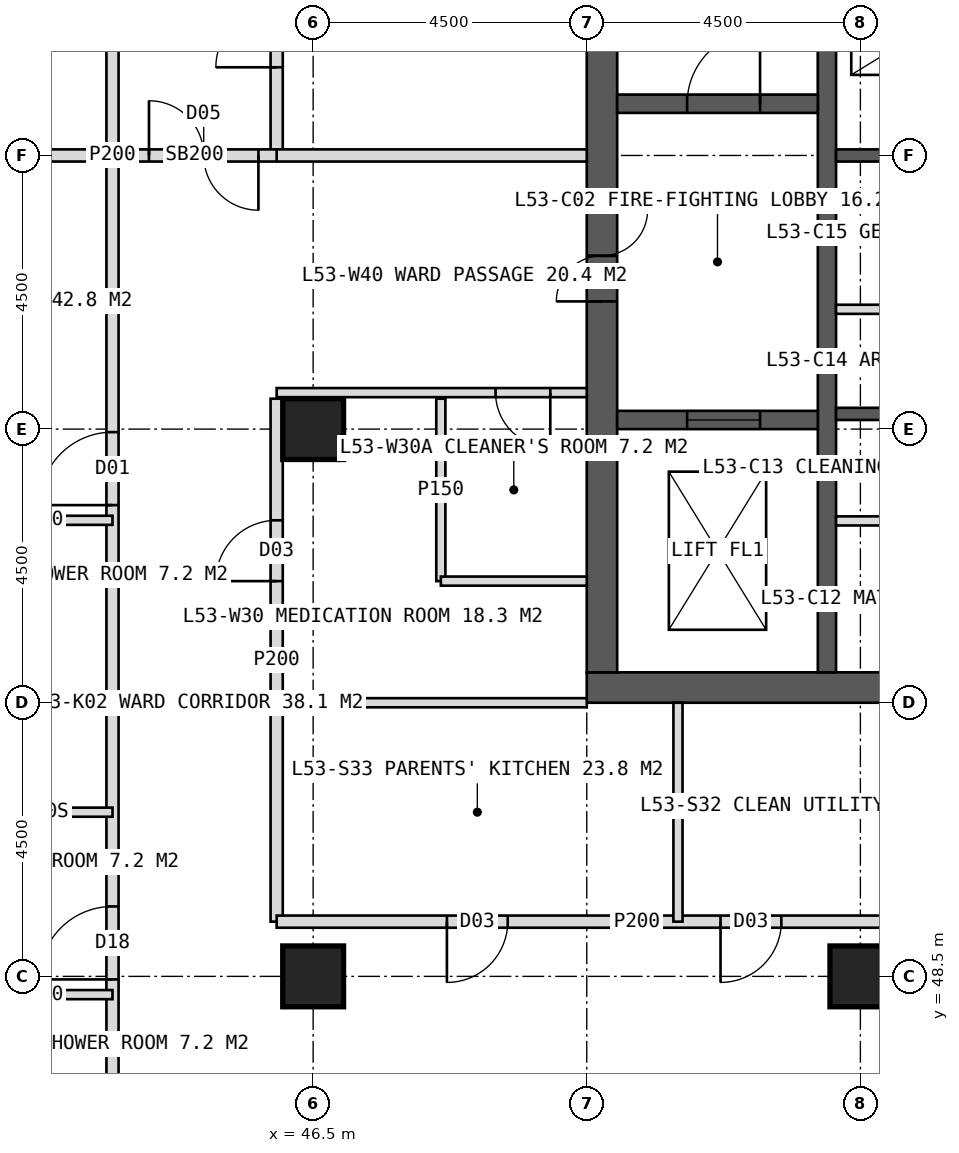
"""IFC4 building model, lengths in metres.
Left out: names, types, materials, properties, quantities, classifications, styles, units other than length and angle.
Written with IfcOpenShell. Run it as: python <this file> out.ifc"""

import sys

from ifc_helpers import new_model, si_unit, direction, frame, frame_2d, origin, origin_2d, place, context, subcontext, project, spatial, rectangle, hollow_rectangle, extrude, element, fill, save


model = new_model("IFC4")
c1 = context("Model", 3, precision=1e-05, world=origin(), true_north=direction((0.0, 1.0)))
c2 = subcontext(c1, "Body", "Model", "MODEL_VIEW")
j1 = project(units=[si_unit("LENGTHUNIT", "METRE"), si_unit("PLANEANGLEUNIT", "RADIAN")], contexts=[c1])
p1 = place(None, origin())
s1 = spatial("IfcSite", under=j1, at=p1, CompositionType="ELEMENT")
p2 = place(p1, origin())
s2 = spatial("IfcBuilding", under=s1, at=p2, CompositionType="ELEMENT")
p3 = place(p2, frame((0.0, 0.0, 221.0)))
s3 = spatial("IfcBuildingStorey", under=s2, at=p3, CompositionType="ELEMENT", Elevation=221.0)
p4 = place(p3, frame((51.0, 53.25, 0.0), z_axis=(0.0, 0.0, 1.0), x_axis=(1.0, 0.0, 0.0)))
e1 = element("IfcWall", 1, at=p4, inside=s3, PredefinedType="SHEAR", context=c2, shape_type="SweptSolid", body=[
    extrude(rectangle(XDim=18.0, YDim=0.5, at=frame_2d((9.0, 0.0))), origin(), (0.0, 0.0, 1.0), 4.0),
])
p5 = place(p4, frame((8.1, 0.0, 0.0)))
e2 = element("IfcOpeningElement", 2, at=p5, cuts=e1, PredefinedType="OPENING", context=c2, shape_type="SweptSolid", body=[
    extrude(rectangle(XDim=1.8, YDim=2.2, at=frame_2d((0.9, 1.1))), frame((0.0, 0.26, 0.0), z_axis=(0.0, -1.0, 0.0), x_axis=(1.0, 0.0, 0.0)), (0.0, 0.0, 1.0), 0.52),
])
p6 = place(p3, frame((51.25, 53.5, 0.0), z_axis=(0.0, 0.0, 1.0), x_axis=(0.0, 1.0, 0.0)))
e3 = element("IfcWall", 3, at=p6, inside=s3, PredefinedType="SHEAR", context=c2, shape_type="SweptSolid", body=[
    extrude(rectangle(XDim=17.0, YDim=0.5, at=frame_2d((8.5, 0.0))), origin(), (0.0, 0.0, 1.0), 4.0),
])
p7 = place(p6, frame((6.1, 0.0, 0.0)))
e4 = element("IfcOpeningElement", 4, at=p7, cuts=e3, PredefinedType="OPENING", context=c2, shape_type="SweptSolid", body=[
    extrude(rectangle(XDim=1.5, YDim=2.2, at=frame_2d((0.75, 1.1))), frame((0.0, 0.26, 0.0), z_axis=(0.0, -1.0, 0.0), x_axis=(1.0, 0.0, 0.0)), (0.0, 0.0, 1.0), 0.52),
])
p8 = place(p3, frame((54.95, 53.5, 0.0), z_axis=(0.0, 0.0, 1.0), x_axis=(0.0, 1.0, 0.0)))
e5 = element("IfcWall", 5, at=p8, inside=s3, PredefinedType="SHEAR", context=c2, shape_type="SweptSolid", body=[
    extrude(rectangle(XDim=17.0, YDim=0.3, at=frame_2d((8.5, 0.0))), origin(), (0.0, 0.0, 1.0), 4.0),
])
for number, where, z_axis, x_axis in (
    (6, (55.1, 57.75, 0.0), (0.0, 0.0, 1.0), (1.0, 0.0, 0.0)),
    (7, (55.1, 62.0, 0.0), (0.0, 0.0, 1.0), (1.0, 0.0, 0.0)),
):
    element("IfcWall", number, at=place(p3, frame(where, z_axis=z_axis, x_axis=x_axis)), inside=s3, PredefinedType="SHEAR", context=c2, shape_type="SweptSolid", body=[
        extrude(rectangle(XDim=3.05, YDim=0.2, at=frame_2d((1.525, 0.0))), origin(), (0.0, 0.0, 1.0), 4.0),
    ])
p9 = place(p3, frame((51.5, 62.85, 0.0), z_axis=(0.0, 0.0, 1.0), x_axis=(1.0, 0.0, 0.0)))
e8 = element("IfcWall", 8, at=p9, inside=s3, PredefinedType="SHEAR", context=c2, shape_type="SweptSolid", body=[
    extrude(rectangle(XDim=3.3, YDim=0.3, at=frame_2d((1.65, 0.0))), origin(), (0.0, 0.0, 1.0), 4.0),
])
p10 = place(p9, frame((1.15, 0.0, 0.0)))
e9 = element("IfcOpeningElement", 9, at=p10, cuts=e8, PredefinedType="OPENING", context=c2, shape_type="SweptSolid", body=[
    extrude(rectangle(XDim=1.2, YDim=2.1, at=frame_2d((0.6, 1.05))), frame((0.0, 0.16, 0.0), z_axis=(0.0, -1.0, 0.0), x_axis=(1.0, 0.0, 0.0)), (0.0, 0.0, 1.0), 0.32),
])
p11 = place(p3, frame((51.5, 57.65, 0.0), z_axis=(0.0, 0.0, 1.0), x_axis=(1.0, 0.0, 0.0)))
e10 = element("IfcWall", 10, at=p11, inside=s3, PredefinedType="SHEAR", context=c2, shape_type="SweptSolid", body=[
    extrude(rectangle(XDim=3.3, YDim=0.3, at=frame_2d((1.65, 0.0))), origin(), (0.0, 0.0, 1.0), 4.0),
])
p12 = place(p11, frame((1.15, 0.0, 0.0)))
e11 = element("IfcOpeningElement", 11, at=p12, cuts=e10, PredefinedType="OPENING", context=c2, shape_type="SweptSolid", body=[
    extrude(rectangle(XDim=1.2, YDim=2.2, at=frame_2d((0.6, 1.1))), frame((0.0, 0.16, 0.0), z_axis=(0.0, -1.0, 0.0), x_axis=(1.0, 0.0, 0.0)), (0.0, 0.0, 1.0), 0.32),
])
for number, where, z_axis, x_axis in (
    (12, (46.5, 48.5, 0.0), (0.0, 0.0, 1.0), (1.0, 0.0, 0.0)),
    (13, (55.5, 48.5, 0.0), (0.0, 0.0, 1.0), (1.0, 0.0, 0.0)),
    (14, (46.5, 57.5, 0.0), (0.0, 0.0, 1.0), (1.0, 0.0, 0.0)),
):
    element("IfcColumn", number, at=place(p3, frame(where, z_axis=z_axis, x_axis=x_axis)), inside=s3, PredefinedType="COLUMN", context=c2, shape_type="SweptSolid", body=[
        extrude(hollow_rectangle(XDim=1.0, YDim=1.0, WallThickness=0.1, at=origin_2d()), origin(), (0.0, 0.0, 1.0), 4.0),
    ])
p13 = place(p3, frame((43.2, 53.0, 0.0), z_axis=(0.0, 0.0, 1.0), x_axis=(-1.0, 0.0, 0.0)))
e15 = element("IfcWall", 15, at=p13, inside=s3, PredefinedType="PARTITIONING", context=c2, shape_type="SweptSolid", body=[
    extrude(rectangle(XDim=5.55, YDim=0.15, at=frame_2d((2.775, 0.0))), origin(), (0.0, 0.0, 1.0), 3.75),
])
p14 = place(p3, frame((43.2, 62.0, 0.0), z_axis=(0.0, 0.0, 1.0), x_axis=(-1.0, 0.0, 0.0)))
e16 = element("IfcWall", 16, at=p14, inside=s3, PredefinedType="SOLIDWALL", context=c2, shape_type="SweptSolid", body=[
    extrude(rectangle(XDim=5.55, YDim=0.2, at=frame_2d((2.775, 0.0))), origin(), (0.0, 0.0, 1.0), 2.95),
])
p15 = place(p3, frame((43.2, 45.2, 0.0), z_axis=(0.0, 0.0, 1.0), x_axis=(0.0, 1.0, 0.0)))
e17 = element("IfcWall", 17, at=p15, inside=s3, PredefinedType="PARTITIONING", context=c2, shape_type="SweptSolid", body=[
    extrude(rectangle(XDim=33.6, YDim=0.2, at=frame_2d((16.8, 0.0))), origin(), (0.0, 0.0, 1.0), 3.75),
])
p16 = place(p15, frame((3.25, 0.0, 0.0)))
e18 = element("IfcOpeningElement", 18, at=p16, cuts=e17, PredefinedType="OPENING", context=c2, shape_type="SweptSolid", body=[
    extrude(rectangle(XDim=1.2, YDim=2.2, at=frame_2d((0.6, 1.1))), frame((0.0, 0.11, 0.0), z_axis=(0.0, -1.0, 0.0), x_axis=(1.0, 0.0, 0.0)), (0.0, 0.0, 1.0), 0.22),
])
p17 = place(p15, frame((11.05, 0.0, 0.0)))
e19 = element("IfcOpeningElement", 19, at=p17, cuts=e17, PredefinedType="OPENING", context=c2, shape_type="SweptSolid", body=[
    extrude(rectangle(XDim=1.2, YDim=2.2, at=frame_2d((0.6, 1.1))), frame((0.0, 0.11, 0.0), z_axis=(0.0, -1.0, 0.0), x_axis=(1.0, 0.0, 0.0)), (0.0, 0.0, 1.0), 0.22),
])
p18 = place(p15, frame((20.05, 0.0, 0.0)))
e20 = element("IfcOpeningElement", 20, at=p18, cuts=e17, PredefinedType="OPENING", context=c2, shape_type="SweptSolid", body=[
    extrude(rectangle(XDim=1.2, YDim=2.2, at=frame_2d((0.6, 1.1))), frame((0.0, 0.11, 0.0), z_axis=(0.0, -1.0, 0.0), x_axis=(1.0, 0.0, 0.0)), (0.0, 0.0, 1.0), 0.22),
])
p19 = place(p15, frame((26.95, 0.0, 0.0)))
e21 = element("IfcOpeningElement", 21, at=p19, cuts=e17, PredefinedType="OPENING", context=c2, shape_type="SweptSolid", body=[
    extrude(rectangle(XDim=1.2, YDim=2.2, at=frame_2d((0.6, 1.1))), frame((0.0, 0.11, 0.0), z_axis=(0.0, -1.0, 0.0), x_axis=(1.0, 0.0, 0.0)), (0.0, 0.0, 1.0), 0.22),
])
for number, where, z_axis, x_axis in (
    (22, (43.2, 48.2, 0.0), (0.0, 0.0, 1.0), (-1.0, 0.0, 0.0)),
    (23, (43.2, 51.2, 0.0), (0.0, 0.0, 1.0), (-1.0, 0.0, 0.0)),
    (24, (43.2, 56.0, 0.0), (0.0, 0.0, 1.0), (-1.0, 0.0, 0.0)),
):
    element("IfcWall", number, at=place(p3, frame(where, z_axis=z_axis, x_axis=x_axis)), inside=s3, PredefinedType="PARTITIONING", context=c2, shape_type="SweptSolid", body=[
        extrude(rectangle(XDim=2.4, YDim=0.15, at=frame_2d((1.2, 0.0))), origin(), (0.0, 0.0, 1.0), 3.75),
    ])
p20 = place(p3, frame((51.0, 53.0, 0.0), z_axis=(0.0, 0.0, 1.0), x_axis=(-1.0, 0.0, 0.0)))
e25 = element("IfcWall", 25, at=p20, inside=s3, PredefinedType="PARTITIONING", context=c2, shape_type="SweptSolid", body=[
    extrude(rectangle(XDim=5.1, YDim=0.15, at=frame_2d((2.55, 0.0))), origin(), (0.0, 0.0, 1.0), 3.75),
])
p21 = place(p3, frame((45.9, 49.4, 0.0), z_axis=(0.0, 0.0, 1.0), x_axis=(0.0, 1.0, 0.0)))
e26 = element("IfcWall", 26, at=p21, inside=s3, PredefinedType="PARTITIONING", context=c2, shape_type="SweptSolid", body=[
    extrude(rectangle(XDim=8.6, YDim=0.2, at=frame_2d((4.3, 0.0))), origin(), (0.0, 0.0, 1.0), 3.75),
])
p22 = place(p21, frame((5.6, 0.0, 0.0)))
e27 = element("IfcOpeningElement", 27, at=p22, cuts=e26, PredefinedType="OPENING", context=c2, shape_type="SweptSolid", body=[
    extrude(rectangle(XDim=1.0, YDim=2.1, at=frame_2d((0.5, 1.05))), frame((0.0, 0.11, 0.0), z_axis=(0.0, -1.0, 0.0), x_axis=(1.0, 0.0, 0.0)), (0.0, 0.0, 1.0), 0.22),
])
p23 = place(p3, frame((45.9, 62.0, 0.0), z_axis=(0.0, 0.0, 1.0), x_axis=(0.0, 1.0, 0.0)))
e28 = element("IfcWall", 28, at=p23, inside=s3, PredefinedType="PARTITIONING", context=c2, shape_type="SweptSolid", body=[
    extrude(rectangle(XDim=14.1, YDim=0.2, at=frame_2d((7.05, 0.0))), origin(), (0.0, 0.0, 1.0), 3.75),
])
p24 = place(p23, frame((1.45, 0.0, 0.0)))
e29 = element("IfcOpeningElement", 29, at=p24, cuts=e28, PredefinedType="OPENING", context=c2, shape_type="SweptSolid", body=[
    extrude(rectangle(XDim=1.0, YDim=2.1, at=frame_2d((0.5, 1.05))), frame((0.0, 0.11, 0.0), z_axis=(0.0, -1.0, 0.0), x_axis=(1.0, 0.0, 0.0)), (0.0, 0.0, 1.0), 0.22),
])
p25 = place(p23, frame((10.3, 0.0, 0.0)))
e30 = element("IfcOpeningElement", 30, at=p25, cuts=e28, PredefinedType="OPENING", context=c2, shape_type="SweptSolid", body=[
    extrude(rectangle(XDim=1.0, YDim=2.1, at=frame_2d((0.5, 1.05))), frame((0.0, 0.11, 0.0), z_axis=(0.0, -1.0, 0.0), x_axis=(1.0, 0.0, 0.0)), (0.0, 0.0, 1.0), 0.22),
])
p26 = place(p3, frame((51.0, 58.1, 0.0), z_axis=(0.0, 0.0, 1.0), x_axis=(-1.0, 0.0, 0.0)))
e31 = element("IfcWall", 31, at=p26, inside=s3, PredefinedType="PARTITIONING", context=c2, shape_type="SweptSolid", body=[
    extrude(rectangle(XDim=5.1, YDim=0.15, at=frame_2d((2.55, 0.0))), origin(), (0.0, 0.0, 1.0), 3.75),
])
p27 = place(p26, frame((0.6, 0.0, 0.0)))
e32 = element("IfcOpeningElement", 32, at=p27, cuts=e31, PredefinedType="OPENING", context=c2, shape_type="SweptSolid", body=[
    extrude(rectangle(XDim=0.9, YDim=2.1, at=frame_2d((0.45, 1.05))), frame((0.0, 0.085, 0.0), z_axis=(0.0, -1.0, 0.0), x_axis=(1.0, 0.0, 0.0)), (0.0, 0.0, 1.0), 0.17),
])
p28 = place(p3, frame((51.0, 62.0, 0.0), z_axis=(0.0, 0.0, 1.0), x_axis=(-1.0, 0.0, 0.0)))
e33 = element("IfcWall", 33, at=p28, inside=s3, PredefinedType="SOLIDWALL", context=c2, shape_type="SweptSolid", body=[
    extrude(rectangle(XDim=5.1, YDim=0.2, at=frame_2d((2.55, 0.0))), origin(), (0.0, 0.0, 1.0), 2.95),
])
p29 = place(p3, frame((48.6, 55.0, 0.0), z_axis=(0.0, 0.0, 1.0), x_axis=(0.0, 1.0, 0.0)))
e34 = element("IfcWall", 34, at=p29, inside=s3, PredefinedType="PARTITIONING", context=c2, shape_type="SweptSolid", body=[
    extrude(rectangle(XDim=3.0, YDim=0.15, at=frame_2d((1.5, 0.0))), origin(), (0.0, 0.0, 1.0), 3.75),
])
p30 = place(p3, frame((51.0, 55.0, 0.0), z_axis=(0.0, 0.0, 1.0), x_axis=(-1.0, 0.0, 0.0)))
e35 = element("IfcWall", 35, at=p30, inside=s3, PredefinedType="PARTITIONING", context=c2, shape_type="SweptSolid", body=[
    extrude(rectangle(XDim=2.4, YDim=0.15, at=frame_2d((1.2, 0.0))), origin(), (0.0, 0.0, 1.0), 3.75),
])
p31 = place(p3, frame((57.75, 49.4, 0.0), z_axis=(0.0, 0.0, 1.0), x_axis=(-1.0, 0.0, 0.0)))
e36 = element("IfcWall", 36, at=p31, inside=s3, PredefinedType="PARTITIONING", context=c2, shape_type="SweptSolid", body=[
    extrude(rectangle(XDim=11.85, YDim=0.2, at=frame_2d((5.925, 0.0))), origin(), (0.0, 0.0, 1.0), 3.75),
])
p32 = place(p31, frame((3.55, 0.0, 0.0)))
e37 = element("IfcOpeningElement", 37, at=p32, cuts=e36, PredefinedType="OPENING", context=c2, shape_type="SweptSolid", body=[
    extrude(rectangle(XDim=1.0, YDim=2.1, at=frame_2d((0.5, 1.05))), frame((0.0, 0.11, 0.0), z_axis=(0.0, -1.0, 0.0), x_axis=(1.0, 0.0, 0.0)), (0.0, 0.0, 1.0), 0.22),
])
p33 = place(p31, frame((8.05, 0.0, 0.0)))
e38 = element("IfcOpeningElement", 38, at=p33, cuts=e36, PredefinedType="OPENING", context=c2, shape_type="SweptSolid", body=[
    extrude(rectangle(XDim=1.0, YDim=2.1, at=frame_2d((0.5, 1.05))), frame((0.0, 0.11, 0.0), z_axis=(0.0, -1.0, 0.0), x_axis=(1.0, 0.0, 0.0)), (0.0, 0.0, 1.0), 0.22),
])
p34 = place(p3, frame((52.5, 53.0, 0.0), z_axis=(0.0, 0.0, 1.0), x_axis=(0.0, -1.0, 0.0)))
e39 = element("IfcWall", 39, at=p34, inside=s3, PredefinedType="PARTITIONING", context=c2, shape_type="SweptSolid", body=[
    extrude(rectangle(XDim=3.6, YDim=0.15, at=frame_2d((1.8, 0.0))), origin(), (0.0, 0.0, 1.0), 3.75),
])
p35 = place(p3, frame((45.9, 62.0, 0.0), z_axis=(0.0, 0.0, 1.0), x_axis=(-1.0, 0.0, 0.0)))
e40 = element("IfcWall", 40, at=p35, inside=s3, PredefinedType="SOLIDWALL", context=c2, shape_type="SweptSolid", body=[
    extrude(rectangle(XDim=2.7, YDim=0.2, at=frame_2d((1.35, 0.0))), origin(), (0.0, 0.0, 1.0), 2.95),
])
p36 = place(p35, frame((0.3, 0.0, 0.0)))
e41 = element("IfcOpeningElement", 41, at=p36, cuts=e40, PredefinedType="OPENING", context=c2, shape_type="SweptSolid", body=[
    extrude(rectangle(XDim=1.8, YDim=2.2, at=frame_2d((0.9, 1.1))), frame((0.0, 0.11, 0.0), z_axis=(0.0, -1.0, 0.0), x_axis=(1.0, 0.0, 0.0)), (0.0, 0.0, 1.0), 0.22),
])
for number, where, z_axis, x_axis in (
    (42, (55.1, 55.99, 0.0), (0.0, 0.0, 1.0), (1.0, 0.0, 0.0)),
    (43, (55.1, 59.47, 0.0), (0.0, 0.0, 1.0), (1.0, 0.0, 0.0)),
):
    element("IfcWall", number, at=place(p3, frame(where, z_axis=z_axis, x_axis=x_axis)), inside=s3, PredefinedType="PARTITIONING", context=c2, shape_type="SweptSolid", body=[
        extrude(rectangle(XDim=3.05, YDim=0.15, at=frame_2d((1.525, 0.0))), origin(), (0.0, 0.0, 1.0), 3.75),
    ])
p37 = place(p16, origin())
e44 = element("IfcDoor", 44, at=p37, inside=s3, OperationType="SINGLE_SWING_LEFT", PredefinedType="DOOR", context=c2, shape_type="SweptSolid", body=[
    extrude(rectangle(XDim=1.2, YDim=2.2, at=frame_2d((0.6, 1.1))), frame((0.0, 0.025, 0.0), z_axis=(0.0, -1.0, 0.0), x_axis=(1.0, 0.0, 0.0)), (0.0, 0.0, 1.0), 0.05),
])
fill(e18, e44)
p38 = place(p17, origin())
e45 = element("IfcDoor", 45, at=p38, inside=s3, OperationType="SINGLE_SWING_LEFT", PredefinedType="DOOR", context=c2, shape_type="SweptSolid", body=[
    extrude(rectangle(XDim=1.2, YDim=2.2, at=frame_2d((0.6, 1.1))), frame((0.0, 0.025, 0.0), z_axis=(0.0, -1.0, 0.0), x_axis=(1.0, 0.0, 0.0)), (0.0, 0.0, 1.0), 0.05),
])
fill(e19, e45)
p39 = place(p27, origin())
e46 = element("IfcDoor", 46, at=p39, inside=s3, OperationType="SINGLE_SWING_LEFT", PredefinedType="DOOR", context=c2, shape_type="SweptSolid", body=[
    extrude(rectangle(XDim=0.9, YDim=2.1, at=frame_2d((0.45, 1.05))), frame((0.0, 0.025, 0.0), z_axis=(0.0, -1.0, 0.0), x_axis=(1.0, 0.0, 0.0)), (0.0, 0.0, 1.0), 0.05),
])
fill(e32, e46)
p40 = place(p22, origin())
e47 = element("IfcDoor", 47, at=p40, inside=s3, OperationType="SINGLE_SWING_LEFT", PredefinedType="DOOR", context=c2, shape_type="SweptSolid", body=[
    extrude(rectangle(XDim=1.0, YDim=2.1, at=frame_2d((0.5, 1.05))), frame((0.0, 0.025, 0.0), z_axis=(0.0, -1.0, 0.0), x_axis=(1.0, 0.0, 0.0)), (0.0, 0.0, 1.0), 0.05),
])
fill(e27, e47)
p41 = place(p24, origin())
e48 = element("IfcDoor", 48, at=p41, inside=s3, OperationType="SINGLE_SWING_LEFT", PredefinedType="DOOR", context=c2, shape_type="SweptSolid", body=[
    extrude(rectangle(XDim=1.0, YDim=2.1, at=frame_2d((0.5, 1.05))), frame((0.0, 0.025, 0.0), z_axis=(0.0, -1.0, 0.0), x_axis=(1.0, 0.0, 0.0)), (0.0, 0.0, 1.0), 0.05),
])
fill(e29, e48)
p42 = place(p32, origin())
e49 = element("IfcDoor", 49, at=p42, inside=s3, OperationType="SINGLE_SWING_RIGHT", PredefinedType="DOOR", context=c2, shape_type="SweptSolid", body=[
    extrude(rectangle(XDim=1.0, YDim=2.1, at=frame_2d((0.5, 1.05))), frame((0.0, 0.025, 0.0), z_axis=(0.0, -1.0, 0.0), x_axis=(1.0, 0.0, 0.0)), (0.0, 0.0, 1.0), 0.05),
])
fill(e37, e49)
p43 = place(p33, origin())
e50 = element("IfcDoor", 50, at=p43, inside=s3, OperationType="SINGLE_SWING_RIGHT", PredefinedType="DOOR", context=c2, shape_type="SweptSolid", body=[
    extrude(rectangle(XDim=1.0, YDim=2.1, at=frame_2d((0.5, 1.05))), frame((0.0, 0.025, 0.0), z_axis=(0.0, -1.0, 0.0), x_axis=(1.0, 0.0, 0.0)), (0.0, 0.0, 1.0), 0.05),
])
fill(e38, e50)
p44 = place(p36, origin())
e51 = element("IfcDoor", 51, at=p44, inside=s3, OperationType="DOUBLE_DOOR_DOUBLE_SWING", PredefinedType="DOOR", context=c2, shape_type="SweptSolid", body=[
    extrude(rectangle(XDim=1.8, YDim=2.2, at=frame_2d((0.9, 1.1))), frame((0.0, 0.025, 0.0), z_axis=(0.0, -1.0, 0.0), x_axis=(1.0, 0.0, 0.0)), (0.0, 0.0, 1.0), 0.05),
])
fill(e41, e51)
p45 = place(p7, origin())
e52 = element("IfcDoor", 52, at=p45, inside=s3, OperationType="DOUBLE_DOOR_SINGLE_SWING", PredefinedType="DOOR", context=c2, shape_type="SweptSolid", body=[
    extrude(rectangle(XDim=1.5, YDim=2.2, at=frame_2d((0.75, 1.1))), frame((0.0, 0.025, 0.0), z_axis=(0.0, -1.0, 0.0), x_axis=(1.0, 0.0, 0.0)), (0.0, 0.0, 1.0), 0.05),
])
fill(e4, e52)
p46 = place(p10, origin())
e53 = element("IfcDoor", 53, at=p46, inside=s3, OperationType="SINGLE_SWING_RIGHT", PredefinedType="DOOR", context=c2, shape_type="SweptSolid", body=[
    extrude(rectangle(XDim=1.2, YDim=2.1, at=frame_2d((0.6, 1.05))), frame((0.0, 0.025, 0.0), z_axis=(0.0, -1.0, 0.0), x_axis=(1.0, 0.0, 0.0)), (0.0, 0.0, 1.0), 0.05),
])
fill(e9, e53)
p47 = place(p12, origin())
e54 = element("IfcDoor", 54, at=p47, inside=s3, OperationType="SLIDING_TO_LEFT", PredefinedType="DOOR", context=c2, shape_type="SweptSolid", body=[
    extrude(rectangle(XDim=1.2, YDim=2.2, at=frame_2d((0.6, 1.1))), frame((0.0, 0.025, 0.0), z_axis=(0.0, -1.0, 0.0), x_axis=(1.0, 0.0, 0.0)), (0.0, 0.0, 1.0), 0.05),
])
fill(e11, e54)
save(model, sys.argv[1])
